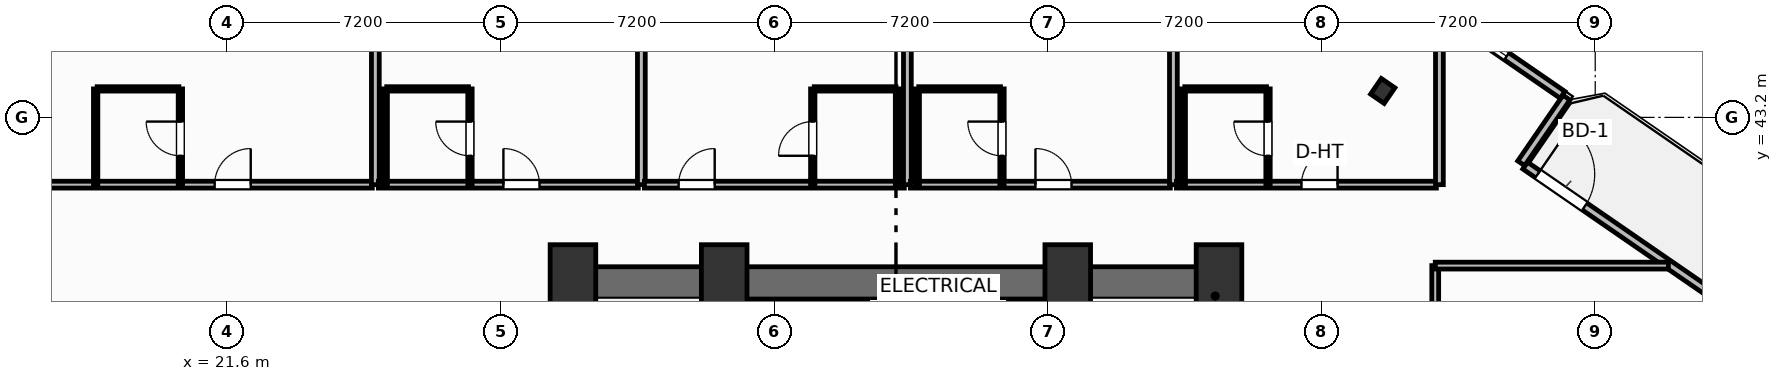
"""IFC4 building model, lengths in metres.
Left out: names, types, materials, properties, quantities, classifications, styles, units other than length and angle.
Written with IfcOpenShell. Run it as: python <this file> out.ifc"""

import sys

from ifc_helpers import new_model, si_unit, direction, frame, frame_2d, origin, origin_2d, place, context, subcontext, project, spatial, rectangle, i_section, extrude, element, fill, save


model = new_model("IFC4")
c1 = context("Model", 3, precision=1e-05, world=origin(), true_north=direction((0.0, 1.0)))
c2 = subcontext(c1, "Body", "Model", "MODEL_VIEW")
j1 = project(units=[si_unit("LENGTHUNIT", "METRE"), si_unit("PLANEANGLEUNIT", "RADIAN")], contexts=[c1])
p1 = place(None, origin())
s1 = spatial("IfcSite", under=j1, at=p1, CompositionType="ELEMENT")
p2 = place(p1, origin())
s2 = spatial("IfcBuilding", under=s1, at=p2, CompositionType="ELEMENT")
p3 = place(p2, frame((0.0, 0.0, 34.4)))
s3 = spatial("IfcBuildingStorey", under=s2, at=p3, CompositionType="ELEMENT", Elevation=34.4)
for number, where, z_axis, x_axis in (
    (1, (30.7, 39.05, 0.0), (0.0, 0.0, 1.0), (1.0, 0.0, 0.0)),
    (2, (34.68, 39.05, 0.0), (0.0, 0.0, 1.0), (1.0, 0.0, 0.0)),
    (3, (43.72, 39.05, 0.0), (0.0, 0.0, 1.0), (1.0, 0.0, 0.0)),
    (4, (47.7, 39.05, 0.0), (0.0, 0.0, 1.0), (1.0, 0.0, 0.0)),
):
    element("IfcColumn", number, at=place(p3, frame(where, z_axis=z_axis, x_axis=x_axis)), inside=s3, PredefinedType="COLUMN", context=c2, shape_type="SweptSolid", body=[
        extrude(rectangle(XDim=1.2, YDim=1.6, at=origin_2d()), origin(), (0.0, 0.0, 1.0), 3.7),
    ])
p4 = place(p3, frame((30.28, 38.845, 0.0), z_axis=(0.0, 0.0, 1.0), x_axis=(1.0, 0.0, 0.0)))
e5 = element("IfcWall", 5, at=p4, inside=s3, PredefinedType="SHEAR", context=c2, shape_type="SweptSolid", body=[
    extrude(rectangle(XDim=17.84, YDim=0.85, at=frame_2d((8.92, 0.0))), origin(), (0.0, 0.0, 1.0), 3.45),
])
for number, where, z_axis, x_axis in (
    (6, (30.705, 29.2, 0.0), (0.0, 0.0, 1.0), (0.0, 1.0, 0.0)),
    (7, (47.695, 29.2, 0.0), (0.0, 0.0, 1.0), (0.0, 1.0, 0.0)),
):
    element("IfcWall", number, at=place(p3, frame(where, z_axis=z_axis, x_axis=x_axis)), inside=s3, PredefinedType="SHEAR", context=c2, shape_type="SweptSolid", body=[
        extrude(rectangle(XDim=9.22, YDim=0.85, at=frame_2d((4.61, 0.0))), origin(), (0.0, 0.0, 1.0), 3.45),
    ])
p5 = place(p3, frame((34.64, 29.2, 0.0), z_axis=(0.0, 0.0, 1.0), x_axis=(0.0, 1.0, 0.0)))
e8 = element("IfcWall", 8, at=p5, inside=s3, PredefinedType="SHEAR", context=c2, shape_type="SweptSolid", body=[
    extrude(rectangle(XDim=9.22, YDim=0.25, at=frame_2d((4.61, 0.0))), origin(), (0.0, 0.0, 1.0), 3.45),
])
p6 = place(p5, frame((0.65, 0.0, 0.0)))
e9 = element("IfcOpeningElement", 9, at=p6, cuts=e8, PredefinedType="OPENING", context=c2, shape_type="SweptSolid", body=[
    extrude(rectangle(XDim=1.05, YDim=2.15, at=frame_2d((0.525, 1.075))), frame((0.0, 0.135, 0.0), z_axis=(0.0, -1.0, 0.0), x_axis=(1.0, 0.0, 0.0)), (0.0, 0.0, 1.0), 0.27),
])
p7 = place(p3, frame((43.76, 29.2, 0.0), z_axis=(0.0, 0.0, 1.0), x_axis=(0.0, 1.0, 0.0)))
e10 = element("IfcWall", 10, at=p7, inside=s3, PredefinedType="SHEAR", context=c2, shape_type="SweptSolid", body=[
    extrude(rectangle(XDim=9.22, YDim=0.25, at=frame_2d((4.61, 0.0))), origin(), (0.0, 0.0, 1.0), 3.45),
])
p8 = place(p7, frame((0.65, 0.0, 0.0)))
e11 = element("IfcOpeningElement", 11, at=p8, cuts=e10, PredefinedType="OPENING", context=c2, shape_type="SweptSolid", body=[
    extrude(rectangle(XDim=1.05, YDim=2.15, at=frame_2d((0.525, 1.075))), frame((0.0, 0.135, 0.0), z_axis=(0.0, -1.0, 0.0), x_axis=(1.0, 0.0, 0.0)), (0.0, 0.0, 1.0), 0.27),
])
p9 = place(p3, frame((52.009, 43.896, 0.0), z_axis=(0.0, 0.0, 1.0), x_axis=(0.823532597628, -0.567268949127, 0.0)))
e12 = element("IfcColumn", 12, at=p9, inside=s3, PredefinedType="COLUMN", context=c2, shape_type="SweptSolid", body=[
    extrude(i_section(OverallWidth=0.432, OverallDepth=0.498, WebThickness=0.056, FlangeThickness=0.089, FilletRadius=0.025, at=origin_2d()), origin(), (0.0, 0.0, 1.0), 3.7),
])
p10 = place(p3, frame((55.757, 41.933, 0.0), z_axis=(0.0, 0.0, 1.0), x_axis=(0.823534636215, -0.567265989598, 0.0)))
e13 = element("IfcWall", 13, at=p10, inside=s3, PredefinedType="SOLIDWALL", context=c2, shape_type="SweptSolid", body=[
    extrude(rectangle(XDim=6.0, YDim=0.22, at=frame_2d((3.0, 0.0))), origin(), (0.0, 0.0, 1.0), 2.73),
])
p11 = place(p10, frame((0.4, 0.0, 0.0)))
e14 = element("IfcOpeningElement", 14, at=p11, cuts=e13, PredefinedType="OPENING", context=c2, shape_type="SweptSolid", body=[
    extrude(rectangle(XDim=1.5, YDim=2.25, at=frame_2d((0.75, 1.125))), frame((0.0, 0.12, 0.0), z_axis=(0.0, -1.0, 0.0), x_axis=(1.0, 0.0, 0.0)), (0.0, 0.0, 1.0), 0.24),
])
p12 = place(p3, frame((55.653, 41.993, 0.0), z_axis=(0.0, 0.0, 1.0), x_axis=(0.567273696173, 0.823529327729, 0.0)))
e15 = element("IfcWall", 15, at=p12, inside=s3, PredefinedType="SOLIDWALL", context=c2, shape_type="SweptSolid", body=[
    extrude(rectangle(XDim=2.1, YDim=0.22, at=frame_2d((1.05, 0.0))), origin(), (0.0, 0.0, 1.0), 2.73),
])
p13 = place(p3, frame((56.741, 43.793, 0.0), z_axis=(0.0, 0.0, 1.0), x_axis=(-0.823530942962, 0.56727135128, 0.0)))
e16 = element("IfcWall", 16, at=p13, inside=s3, PredefinedType="SOLIDWALL", context=c2, shape_type="SweptSolid", body=[
    extrude(rectangle(XDim=8.035, YDim=0.22, at=frame_2d((4.018, 0.0))), origin(), (0.0, 0.0, 1.0), 2.73),
])
p14 = place(p13, frame((1.788, 0.0, 0.8)))
e17 = element("IfcOpeningElement", 17, at=p14, cuts=e16, PredefinedType="OPENING", context=c2, shape_type="SweptSolid", body=[
    extrude(rectangle(XDim=1.65, YDim=1.65, at=frame_2d((0.825, 0.825))), frame((0.0, 0.12, 0.0), z_axis=(0.0, -1.0, 0.0), x_axis=(1.0, 0.0, 0.0)), (0.0, 0.0, 1.0), 0.24),
])
p15 = place(p3, frame((2.921, 41.43, 0.0), z_axis=(0.0, 0.0, 1.0), x_axis=(1.0, 0.0, 0.0)))
e18 = element("IfcWall", 18, at=p15, inside=s3, PredefinedType="PARTITIONING", context=c2, shape_type="SweptSolid", body=[
    extrude(rectangle(XDim=22.499, YDim=0.18, at=frame_2d((11.25, 0.0))), origin(), (0.0, 0.0, 1.0), 3.45),
])
p16 = place(p15, frame((18.35, 0.0, 0.0)))
e19 = element("IfcOpeningElement", 19, at=p16, cuts=e18, PredefinedType="OPENING", context=c2, shape_type="SweptSolid", body=[
    extrude(rectangle(XDim=0.95, YDim=2.15, at=frame_2d((0.475, 1.075))), frame((0.0, 0.1, 0.0), z_axis=(0.0, -1.0, 0.0), x_axis=(1.0, 0.0, 0.0)), (0.0, 0.0, 1.0), 0.2),
])
p17 = place(p3, frame((18.18, 43.95, 0.0), z_axis=(0.0, 0.0, 1.0), x_axis=(1.0, 0.0, 0.0)))
e20 = element("IfcWall", 20, at=p17, inside=s3, PredefinedType="PARTITIONING", context=c2, shape_type="SweptSolid", body=[
    extrude(rectangle(XDim=2.15, YDim=0.115, at=frame_2d((1.075, 0.0))), origin(), (0.0, 0.0, 1.0), 3.45),
])
p18 = place(p3, frame((20.37, 41.43, 0.0), z_axis=(0.0, 0.0, 1.0), x_axis=(0.0, 1.0, 0.0)))
e21 = element("IfcWall", 21, at=p18, inside=s3, PredefinedType="PARTITIONING", context=c2, shape_type="SweptSolid", body=[
    extrude(rectangle(XDim=2.52, YDim=0.115, at=frame_2d((1.26, 0.0))), origin(), (0.0, 0.0, 1.0), 3.45),
])
p19 = place(p18, frame((0.76, 0.0, 0.0)))
e22 = element("IfcOpeningElement", 22, at=p19, cuts=e21, PredefinedType="OPENING", context=c2, shape_type="SweptSolid", body=[
    extrude(rectangle(XDim=0.9, YDim=2.05, at=frame_2d((0.45, 1.025))), frame((0.0, 0.067, 0.0), z_axis=(0.0, -1.0, 0.0), x_axis=(1.0, 0.0, 0.0)), (0.0, 0.0, 1.0), 0.135),
])
p20 = place(p3, frame((18.14, 41.43, 0.0), z_axis=(0.0, 0.0, 1.0), x_axis=(0.0, 1.0, 0.0)))
e23 = element("IfcWall", 23, at=p20, inside=s3, PredefinedType="PARTITIONING", context=c2, shape_type="SweptSolid", body=[
    extrude(rectangle(XDim=2.52, YDim=0.115, at=frame_2d((1.26, 0.0))), origin(), (0.0, 0.0, 1.0), 3.45),
])
p21 = place(p3, frame((25.5, 41.43, 0.0), z_axis=(0.0, 0.0, 1.0), x_axis=(0.0, 1.0, 0.0)))
e24 = element("IfcWall", 24, at=p21, inside=s3, PredefinedType="PARTITIONING", context=c2, shape_type="SweptSolid", body=[
    extrude(rectangle(XDim=14.57, YDim=0.205, at=frame_2d((7.285, 0.0))), origin(), (0.0, 0.0, 1.0), 3.45),
])
p22 = place(p3, frame((25.58, 41.43, 0.0), z_axis=(0.0, 0.0, 1.0), x_axis=(1.0, 0.0, 0.0)))
e25 = element("IfcWall", 25, at=p22, inside=s3, PredefinedType="PARTITIONING", context=c2, shape_type="SweptSolid", body=[
    extrude(rectangle(XDim=6.84, YDim=0.18, at=frame_2d((3.42, 0.0))), origin(), (0.0, 0.0, 1.0), 3.45),
])
p23 = place(p22, frame((3.29, 0.0, 0.0)))
e26 = element("IfcOpeningElement", 26, at=p23, cuts=e25, PredefinedType="OPENING", context=c2, shape_type="SweptSolid", body=[
    extrude(rectangle(XDim=0.95, YDim=2.15, at=frame_2d((0.475, 1.075))), frame((0.0, 0.1, 0.0), z_axis=(0.0, -1.0, 0.0), x_axis=(1.0, 0.0, 0.0)), (0.0, 0.0, 1.0), 0.2),
])
p24 = place(p3, frame((25.8, 43.95, 0.0), z_axis=(0.0, 0.0, 1.0), x_axis=(1.0, 0.0, 0.0)))
e27 = element("IfcWall", 27, at=p24, inside=s3, PredefinedType="PARTITIONING", context=c2, shape_type="SweptSolid", body=[
    extrude(rectangle(XDim=2.15, YDim=0.115, at=frame_2d((1.075, 0.0))), origin(), (0.0, 0.0, 1.0), 3.45),
])
p25 = place(p3, frame((27.99, 41.43, 0.0), z_axis=(0.0, 0.0, 1.0), x_axis=(0.0, 1.0, 0.0)))
e28 = element("IfcWall", 28, at=p25, inside=s3, PredefinedType="PARTITIONING", context=c2, shape_type="SweptSolid", body=[
    extrude(rectangle(XDim=2.52, YDim=0.115, at=frame_2d((1.26, 0.0))), origin(), (0.0, 0.0, 1.0), 3.45),
])
p26 = place(p25, frame((0.76, 0.0, 0.0)))
e29 = element("IfcOpeningElement", 29, at=p26, cuts=e28, PredefinedType="OPENING", context=c2, shape_type="SweptSolid", body=[
    extrude(rectangle(XDim=0.9, YDim=2.05, at=frame_2d((0.45, 1.025))), frame((0.0, 0.067, 0.0), z_axis=(0.0, -1.0, 0.0), x_axis=(1.0, 0.0, 0.0)), (0.0, 0.0, 1.0), 0.135),
])
p27 = place(p3, frame((25.76, 41.43, 0.0), z_axis=(0.0, 0.0, 1.0), x_axis=(0.0, 1.0, 0.0)))
e30 = element("IfcWall", 30, at=p27, inside=s3, PredefinedType="PARTITIONING", context=c2, shape_type="SweptSolid", body=[
    extrude(rectangle(XDim=2.52, YDim=0.115, at=frame_2d((1.26, 0.0))), origin(), (0.0, 0.0, 1.0), 3.45),
])
p28 = place(p3, frame((32.5, 41.43, 0.0), z_axis=(0.0, 0.0, 1.0), x_axis=(0.0, 1.0, 0.0)))
e31 = element("IfcWall", 31, at=p28, inside=s3, PredefinedType="PARTITIONING", context=c2, shape_type="SweptSolid", body=[
    extrude(rectangle(XDim=14.57, YDim=0.205, at=frame_2d((7.285, 0.0))), origin(), (0.0, 0.0, 1.0), 3.45),
])
p29 = place(p3, frame((32.58, 41.43, 0.0), z_axis=(0.0, 0.0, 1.0), x_axis=(1.0, 0.0, 0.0)))
e32 = element("IfcWall", 32, at=p29, inside=s3, PredefinedType="PARTITIONING", context=c2, shape_type="SweptSolid", body=[
    extrude(rectangle(XDim=6.84, YDim=0.18, at=frame_2d((3.42, 0.0))), origin(), (0.0, 0.0, 1.0), 3.45),
])
p30 = place(p29, frame((0.9, 0.0, 0.0)))
e33 = element("IfcOpeningElement", 33, at=p30, cuts=e32, PredefinedType="OPENING", context=c2, shape_type="SweptSolid", body=[
    extrude(rectangle(XDim=0.95, YDim=2.15, at=frame_2d((0.475, 1.075))), frame((0.0, 0.1, 0.0), z_axis=(0.0, -1.0, 0.0), x_axis=(1.0, 0.0, 0.0)), (0.0, 0.0, 1.0), 0.2),
])
p31 = place(p3, frame((37.05, 43.95, 0.0), z_axis=(0.0, 0.0, 1.0), x_axis=(1.0, 0.0, 0.0)))
e34 = element("IfcWall", 34, at=p31, inside=s3, PredefinedType="PARTITIONING", context=c2, shape_type="SweptSolid", body=[
    extrude(rectangle(XDim=2.15, YDim=0.115, at=frame_2d((1.075, 0.0))), origin(), (0.0, 0.0, 1.0), 3.45),
])
p32 = place(p3, frame((37.01, 41.43, 0.0), z_axis=(0.0, 0.0, 1.0), x_axis=(0.0, 1.0, 0.0)))
e35 = element("IfcWall", 35, at=p32, inside=s3, PredefinedType="PARTITIONING", context=c2, shape_type="SweptSolid", body=[
    extrude(rectangle(XDim=2.52, YDim=0.115, at=frame_2d((1.26, 0.0))), origin(), (0.0, 0.0, 1.0), 3.45),
])
p33 = place(p32, frame((0.76, 0.0, 0.0)))
e36 = element("IfcOpeningElement", 36, at=p33, cuts=e35, PredefinedType="OPENING", context=c2, shape_type="SweptSolid", body=[
    extrude(rectangle(XDim=0.9, YDim=2.05, at=frame_2d((0.45, 1.025))), frame((0.0, 0.067, 0.0), z_axis=(0.0, -1.0, 0.0), x_axis=(1.0, 0.0, 0.0)), (0.0, 0.0, 1.0), 0.135),
])
p34 = place(p3, frame((39.24, 41.43, 0.0), z_axis=(0.0, 0.0, 1.0), x_axis=(0.0, 1.0, 0.0)))
e37 = element("IfcWall", 37, at=p34, inside=s3, PredefinedType="PARTITIONING", context=c2, shape_type="SweptSolid", body=[
    extrude(rectangle(XDim=2.52, YDim=0.115, at=frame_2d((1.26, 0.0))), origin(), (0.0, 0.0, 1.0), 3.45),
])
p35 = place(p3, frame((39.5, 41.43, 0.0), z_axis=(0.0, 0.0, 1.0), x_axis=(0.0, 1.0, 0.0)))
e38 = element("IfcWall", 38, at=p35, inside=s3, PredefinedType="PARTITIONING", context=c2, shape_type="SweptSolid", body=[
    extrude(rectangle(XDim=14.215, YDim=0.205, at=frame_2d((7.107, 0.0))), origin(), (0.0, 0.0, 1.0), 3.45),
])
p36 = place(p3, frame((39.58, 41.43, 0.0), z_axis=(0.0, 0.0, 1.0), x_axis=(1.0, 0.0, 0.0)))
e39 = element("IfcWall", 39, at=p36, inside=s3, PredefinedType="PARTITIONING", context=c2, shape_type="SweptSolid", body=[
    extrude(rectangle(XDim=6.84, YDim=0.18, at=frame_2d((3.42, 0.0))), origin(), (0.0, 0.0, 1.0), 3.45),
])
p37 = place(p36, frame((3.29, 0.0, 0.0)))
e40 = element("IfcOpeningElement", 40, at=p37, cuts=e39, PredefinedType="OPENING", context=c2, shape_type="SweptSolid", body=[
    extrude(rectangle(XDim=0.95, YDim=2.15, at=frame_2d((0.475, 1.075))), frame((0.0, 0.1, 0.0), z_axis=(0.0, -1.0, 0.0), x_axis=(1.0, 0.0, 0.0)), (0.0, 0.0, 1.0), 0.2),
])
p38 = place(p3, frame((39.8, 43.95, 0.0), z_axis=(0.0, 0.0, 1.0), x_axis=(1.0, 0.0, 0.0)))
e41 = element("IfcWall", 41, at=p38, inside=s3, PredefinedType="PARTITIONING", context=c2, shape_type="SweptSolid", body=[
    extrude(rectangle(XDim=2.15, YDim=0.115, at=frame_2d((1.075, 0.0))), origin(), (0.0, 0.0, 1.0), 3.45),
])
p39 = place(p3, frame((41.99, 41.43, 0.0), z_axis=(0.0, 0.0, 1.0), x_axis=(0.0, 1.0, 0.0)))
e42 = element("IfcWall", 42, at=p39, inside=s3, PredefinedType="PARTITIONING", context=c2, shape_type="SweptSolid", body=[
    extrude(rectangle(XDim=2.52, YDim=0.115, at=frame_2d((1.26, 0.0))), origin(), (0.0, 0.0, 1.0), 3.45),
])
p40 = place(p39, frame((0.76, 0.0, 0.0)))
e43 = element("IfcOpeningElement", 43, at=p40, cuts=e42, PredefinedType="OPENING", context=c2, shape_type="SweptSolid", body=[
    extrude(rectangle(XDim=0.9, YDim=2.05, at=frame_2d((0.45, 1.025))), frame((0.0, 0.067, 0.0), z_axis=(0.0, -1.0, 0.0), x_axis=(1.0, 0.0, 0.0)), (0.0, 0.0, 1.0), 0.135),
])
p41 = place(p3, frame((39.76, 41.43, 0.0), z_axis=(0.0, 0.0, 1.0), x_axis=(0.0, 1.0, 0.0)))
e44 = element("IfcWall", 44, at=p41, inside=s3, PredefinedType="PARTITIONING", context=c2, shape_type="SweptSolid", body=[
    extrude(rectangle(XDim=2.52, YDim=0.115, at=frame_2d((1.26, 0.0))), origin(), (0.0, 0.0, 1.0), 3.45),
])
p42 = place(p3, frame((46.5, 41.43, 0.0), z_axis=(0.0, 0.0, 1.0), x_axis=(0.0, 1.0, 0.0)))
e45 = element("IfcWall", 45, at=p42, inside=s3, PredefinedType="PARTITIONING", context=c2, shape_type="SweptSolid", body=[
    extrude(rectangle(XDim=6.843, YDim=0.205, at=frame_2d((3.421, 0.0))), origin(), (0.0, 0.0, 1.0), 2.58),
])
p43 = place(p3, frame((46.58, 41.43, 0.0), z_axis=(0.0, 0.0, 1.0), x_axis=(1.0, 0.0, 0.0)))
e46 = element("IfcWall", 46, at=p43, inside=s3, PredefinedType="PARTITIONING", context=c2, shape_type="SweptSolid", body=[
    extrude(rectangle(XDim=6.84, YDim=0.18, at=frame_2d((3.42, 0.0))), origin(), (0.0, 0.0, 1.0), 3.45),
])
p44 = place(p43, frame((3.29, 0.0, 0.0)))
e47 = element("IfcOpeningElement", 47, at=p44, cuts=e46, PredefinedType="OPENING", context=c2, shape_type="SweptSolid", body=[
    extrude(rectangle(XDim=0.95, YDim=2.15, at=frame_2d((0.475, 1.075))), frame((0.0, 0.1, 0.0), z_axis=(0.0, -1.0, 0.0), x_axis=(1.0, 0.0, 0.0)), (0.0, 0.0, 1.0), 0.2),
])
p45 = place(p3, frame((46.8, 43.95, 0.0), z_axis=(0.0, 0.0, 1.0), x_axis=(1.0, 0.0, 0.0)))
e48 = element("IfcWall", 48, at=p45, inside=s3, PredefinedType="PARTITIONING", context=c2, shape_type="SweptSolid", body=[
    extrude(rectangle(XDim=2.15, YDim=0.115, at=frame_2d((1.075, 0.0))), origin(), (0.0, 0.0, 1.0), 3.45),
])
p46 = place(p3, frame((48.99, 41.43, 0.0), z_axis=(0.0, 0.0, 1.0), x_axis=(0.0, 1.0, 0.0)))
e49 = element("IfcWall", 49, at=p46, inside=s3, PredefinedType="PARTITIONING", context=c2, shape_type="SweptSolid", body=[
    extrude(rectangle(XDim=2.52, YDim=0.115, at=frame_2d((1.26, 0.0))), origin(), (0.0, 0.0, 1.0), 3.45),
])
p47 = place(p46, frame((0.76, 0.0, 0.0)))
e50 = element("IfcOpeningElement", 50, at=p47, cuts=e49, PredefinedType="OPENING", context=c2, shape_type="SweptSolid", body=[
    extrude(rectangle(XDim=0.9, YDim=2.05, at=frame_2d((0.45, 1.025))), frame((0.0, 0.067, 0.0), z_axis=(0.0, -1.0, 0.0), x_axis=(1.0, 0.0, 0.0)), (0.0, 0.0, 1.0), 0.135),
])
p48 = place(p3, frame((46.76, 41.43, 0.0), z_axis=(0.0, 0.0, 1.0), x_axis=(0.0, 1.0, 0.0)))
e51 = element("IfcWall", 51, at=p48, inside=s3, PredefinedType="PARTITIONING", context=c2, shape_type="SweptSolid", body=[
    extrude(rectangle(XDim=2.52, YDim=0.115, at=frame_2d((1.26, 0.0))), origin(), (0.0, 0.0, 1.0), 2.58),
])
p49 = place(p3, frame((53.5, 41.43, 0.0), z_axis=(0.0, 0.0, 1.0), x_axis=(0.0, 1.0, 0.0)))
e52 = element("IfcWall", 52, at=p49, inside=s3, PredefinedType="PARTITIONING", context=c2, shape_type="SweptSolid", body=[
    extrude(rectangle(XDim=4.571, YDim=0.205, at=frame_2d((2.286, 0.0))), origin(), (0.0, 0.0, 1.0), 3.45),
])
p50 = place(p3, frame((53.39, 19.24, 0.0), z_axis=(0.0, 0.0, 1.0), x_axis=(0.0, 1.0, 0.0)))
e53 = element("IfcWall", 53, at=p50, inside=s3, PredefinedType="PARTITIONING", context=c2, shape_type="SweptSolid", body=[
    extrude(rectangle(XDim=20.06, YDim=0.18, at=frame_2d((10.03, 0.0))), origin(), (0.0, 0.0, 1.0), 3.45),
])
p51 = place(p50, frame((7.7, 0.0, 0.0)))
e54 = element("IfcOpeningElement", 54, at=p51, cuts=e53, PredefinedType="OPENING", context=c2, shape_type="SweptSolid", body=[
    extrude(rectangle(XDim=0.95, YDim=2.05, at=frame_2d((0.475, 1.025))), frame((0.0, 0.1, 0.0), z_axis=(0.0, -1.0, 0.0), x_axis=(1.0, 0.0, 0.0)), (0.0, 0.0, 1.0), 0.2),
])
p52 = place(p3, frame((53.39, 39.3, 0.0), z_axis=(0.0, 0.0, 1.0), x_axis=(1.0, 0.0, 0.0)))
e55 = element("IfcWall", 55, at=p52, inside=s3, PredefinedType="PARTITIONING", context=c2, shape_type="SweptSolid", body=[
    extrude(rectangle(XDim=6.136, YDim=0.18, at=frame_2d((3.068, 0.0))), origin(), (0.0, 0.0, 1.0), 3.45),
])
p53 = place(p11, origin())
e56 = element("IfcDoor", 56, at=p53, inside=s3, OperationType="SINGLE_SWING_LEFT", PredefinedType="DOOR", context=c2, shape_type="SweptSolid", body=[
    extrude(rectangle(XDim=1.5, YDim=2.25, at=frame_2d((0.75, 1.125))), frame((0.0, 0.025, 0.0), z_axis=(0.0, -1.0, 0.0), x_axis=(1.0, 0.0, 0.0)), (0.0, 0.0, 1.0), 0.05),
])
fill(e14, e56)
p54 = place(p14, origin())
e57 = element("IfcWindow", 57, at=p54, inside=s3, PartitioningType="SINGLE_PANEL", PredefinedType="WINDOW", context=c2, shape_type="SweptSolid", body=[
    extrude(rectangle(XDim=1.65, YDim=1.65, at=frame_2d((0.825, 0.825))), frame((0.0, 0.03, 0.0), z_axis=(0.0, -1.0, 0.0), x_axis=(1.0, 0.0, 0.0)), (0.0, 0.0, 1.0), 0.06),
])
fill(e17, e57)
p55 = place(p16, origin())
e58 = element("IfcDoor", 58, at=p55, inside=s3, OperationType="SINGLE_SWING_RIGHT", PredefinedType="DOOR", context=c2, shape_type="SweptSolid", body=[
    extrude(rectangle(XDim=0.95, YDim=2.15, at=frame_2d((0.475, 1.075))), frame((0.0, 0.025, 0.0), z_axis=(0.0, -1.0, 0.0), x_axis=(1.0, 0.0, 0.0)), (0.0, 0.0, 1.0), 0.05),
])
fill(e19, e58)
p56 = place(p19, origin())
e59 = element("IfcDoor", 59, at=p56, inside=s3, OperationType="SINGLE_SWING_RIGHT", PredefinedType="DOOR", context=c2, shape_type="SweptSolid", body=[
    extrude(rectangle(XDim=0.9, YDim=2.05, at=frame_2d((0.45, 1.025))), frame((0.0, 0.025, 0.0), z_axis=(0.0, -1.0, 0.0), x_axis=(1.0, 0.0, 0.0)), (0.0, 0.0, 1.0), 0.05),
])
fill(e22, e59)
p57 = place(p23, origin())
e60 = element("IfcDoor", 60, at=p57, inside=s3, OperationType="SINGLE_SWING_LEFT", PredefinedType="DOOR", context=c2, shape_type="SweptSolid", body=[
    extrude(rectangle(XDim=0.95, YDim=2.15, at=frame_2d((0.475, 1.075))), frame((0.0, 0.025, 0.0), z_axis=(0.0, -1.0, 0.0), x_axis=(1.0, 0.0, 0.0)), (0.0, 0.0, 1.0), 0.05),
])
fill(e26, e60)
p58 = place(p26, origin())
e61 = element("IfcDoor", 61, at=p58, inside=s3, OperationType="SINGLE_SWING_RIGHT", PredefinedType="DOOR", context=c2, shape_type="SweptSolid", body=[
    extrude(rectangle(XDim=0.9, YDim=2.05, at=frame_2d((0.45, 1.025))), frame((0.0, 0.025, 0.0), z_axis=(0.0, -1.0, 0.0), x_axis=(1.0, 0.0, 0.0)), (0.0, 0.0, 1.0), 0.05),
])
fill(e29, e61)
p59 = place(p30, origin())
e62 = element("IfcDoor", 62, at=p59, inside=s3, OperationType="SINGLE_SWING_RIGHT", PredefinedType="DOOR", context=c2, shape_type="SweptSolid", body=[
    extrude(rectangle(XDim=0.95, YDim=2.15, at=frame_2d((0.475, 1.075))), frame((0.0, 0.025, 0.0), z_axis=(0.0, -1.0, 0.0), x_axis=(1.0, 0.0, 0.0)), (0.0, 0.0, 1.0), 0.05),
])
fill(e33, e62)
p60 = place(p33, origin())
e63 = element("IfcDoor", 63, at=p60, inside=s3, OperationType="SINGLE_SWING_LEFT", PredefinedType="DOOR", context=c2, shape_type="SweptSolid", body=[
    extrude(rectangle(XDim=0.9, YDim=2.05, at=frame_2d((0.45, 1.025))), frame((0.0, 0.025, 0.0), z_axis=(0.0, -1.0, 0.0), x_axis=(1.0, 0.0, 0.0)), (0.0, 0.0, 1.0), 0.05),
])
fill(e36, e63)
p61 = place(p37, origin())
e64 = element("IfcDoor", 64, at=p61, inside=s3, OperationType="SINGLE_SWING_LEFT", PredefinedType="DOOR", context=c2, shape_type="SweptSolid", body=[
    extrude(rectangle(XDim=0.95, YDim=2.15, at=frame_2d((0.475, 1.075))), frame((0.0, 0.025, 0.0), z_axis=(0.0, -1.0, 0.0), x_axis=(1.0, 0.0, 0.0)), (0.0, 0.0, 1.0), 0.05),
])
fill(e40, e64)
p62 = place(p40, origin())
e65 = element("IfcDoor", 65, at=p62, inside=s3, OperationType="SINGLE_SWING_RIGHT", PredefinedType="DOOR", context=c2, shape_type="SweptSolid", body=[
    extrude(rectangle(XDim=0.9, YDim=2.05, at=frame_2d((0.45, 1.025))), frame((0.0, 0.025, 0.0), z_axis=(0.0, -1.0, 0.0), x_axis=(1.0, 0.0, 0.0)), (0.0, 0.0, 1.0), 0.05),
])
fill(e43, e65)
p63 = place(p44, origin())
e66 = element("IfcDoor", 66, at=p63, inside=s3, OperationType="SINGLE_SWING_RIGHT", PredefinedType="DOOR", context=c2, shape_type="SweptSolid", body=[
    extrude(rectangle(XDim=0.95, YDim=2.15, at=frame_2d((0.475, 1.075))), frame((0.0, 0.025, 0.0), z_axis=(0.0, -1.0, 0.0), x_axis=(1.0, 0.0, 0.0)), (0.0, 0.0, 1.0), 0.05),
])
fill(e47, e66)
p64 = place(p47, origin())
e67 = element("IfcDoor", 67, at=p64, inside=s3, OperationType="SINGLE_SWING_RIGHT", PredefinedType="DOOR", context=c2, shape_type="SweptSolid", body=[
    extrude(rectangle(XDim=0.9, YDim=2.05, at=frame_2d((0.45, 1.025))), frame((0.0, 0.025, 0.0), z_axis=(0.0, -1.0, 0.0), x_axis=(1.0, 0.0, 0.0)), (0.0, 0.0, 1.0), 0.05),
])
fill(e50, e67)
save(model, sys.argv[1])
